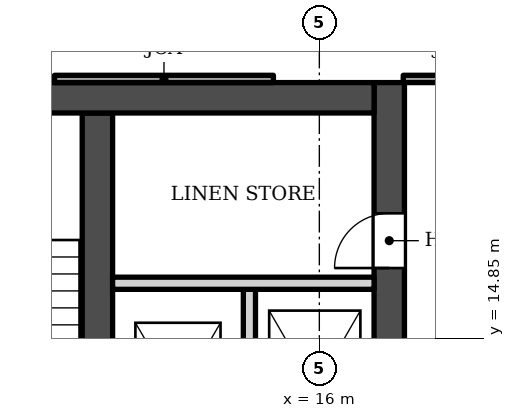
"""IFC4 building model, lengths in metres.
Left out: names, types, materials, properties, quantities, classifications, styles, units other than length and angle.
Written with IfcOpenShell. Run it as: python <this file> out.ifc"""

import sys

from ifc_helpers import new_model, si_unit, direction, frame, frame_2d, origin, place, context, subcontext, project, spatial, polyline, rectangle, outline, extrude, element, fill, save


model = new_model("IFC4")
c1 = context("Model", 3, precision=1e-05, world=origin(), true_north=direction((0.0, 1.0)))
c2 = subcontext(c1, "Body", "Model", "MODEL_VIEW")
j1 = project(units=[si_unit("LENGTHUNIT", "METRE"), si_unit("PLANEANGLEUNIT", "RADIAN")], contexts=[c1])
p1 = place(None, origin())
s1 = spatial("IfcSite", under=j1, at=p1, CompositionType="ELEMENT")
p2 = place(p1, origin())
s2 = spatial("IfcBuilding", under=s1, at=p2, CompositionType="ELEMENT")
p3 = place(p2, frame((0.0, 0.0, 91.8)))
s3 = spatial("IfcBuildingStorey", under=s2, at=p3, CompositionType="ELEMENT", Elevation=91.8)
p4 = place(p3, frame((-16.9, 18.802, 0.0), z_axis=(0.0, 0.0, 1.0), x_axis=(1.0, 0.0, 0.0)))
e1 = element("IfcWall", 1, at=p4, inside=s3, PredefinedType="SHEAR", context=c2, shape_type="SweptSolid", body=[
    extrude(rectangle(XDim=33.8, YDim=0.5, at=frame_2d((16.9, 0.0))), origin(), (0.0, 0.0, 1.0), 3.4),
])
p5 = place(p3, frame((12.35, 5.253, 0.0), z_axis=(0.0, 0.0, 1.0), x_axis=(0.0, 1.0, 0.0)))
e2 = element("IfcWall", 2, at=p5, inside=s3, PredefinedType="SHEAR", context=c2, shape_type="SweptSolid", body=[
    extrude(rectangle(XDim=13.3, YDim=0.5, at=frame_2d((6.65, 0.0))), origin(), (0.0, 0.0, 1.0), 3.4),
])
p6 = place(p3, frame((17.15, 5.853, 0.0), z_axis=(0.0, 0.0, 1.0), x_axis=(0.0, 1.0, 0.0)))
e3 = element("IfcWall", 3, at=p6, inside=s3, PredefinedType="SHEAR", context=c2, shape_type="SweptSolid", body=[
    extrude(rectangle(XDim=13.2, YDim=0.5, at=frame_2d((6.6, 0.0))), origin(), (0.0, 0.0, 1.0), 3.4),
])
p7 = place(p6, frame((4.1, 0.0, 0.0)))
e4 = element("IfcOpeningElement", 4, at=p7, cuts=e3, PredefinedType="OPENING", context=c2, shape_type="SweptSolid", body=[
    extrude(rectangle(XDim=1.6, YDim=2.1, at=frame_2d((0.8, 1.05))), frame((0.0, 0.26, 0.0), z_axis=(0.0, -1.0, 0.0), x_axis=(1.0, 0.0, 0.0)), (0.0, 0.0, 1.0), 0.52),
])
p8 = place(p6, frame((10.15, 0.0, 0.0)))
e5 = element("IfcOpeningElement", 5, at=p8, cuts=e3, PredefinedType="OPENING", context=c2, shape_type="SweptSolid", body=[
    extrude(rectangle(XDim=0.9, YDim=2.1, at=frame_2d((0.45, 1.05))), frame((0.0, 0.26, 0.0), z_axis=(0.0, -1.0, 0.0), x_axis=(1.0, 0.0, 0.0)), (0.0, 0.0, 1.0), 0.52),
])
p9 = place(p3, origin())
e6 = element("IfcWall", 6, at=p9, inside=s3, PredefinedType="SOLIDWALL", context=c2, shape_type="SweptSolid", body=[
    extrude(outline(polyline([(11.645, 19.173), (11.645, 19.052), (15.245, 19.052), (15.245, 19.173), (11.645, 19.173)])), origin(), (0.0, 0.0, 1.0), 2.65),
])
p10 = place(p3, frame((17.38, 19.113, 0.0), z_axis=(0.0, 0.0, 1.0), x_axis=(1.0, 0.0, 0.0)))
e7 = element("IfcWall", 7, at=p10, inside=s3, PredefinedType="SOLIDWALL", context=c2, shape_type="SweptSolid", body=[
    extrude(rectangle(XDim=1.59, YDim=0.12, at=frame_2d((0.795, 0.0))), origin(), (0.0, 0.0, 1.0), 2.65),
])
p11 = place(p3, frame((14.85, 12.653, 0.0), z_axis=(0.0, 0.0, 1.0), x_axis=(0.0, 1.0, 0.0)))
e8 = element("IfcWall", 8, at=p11, inside=s3, PredefinedType="SOLIDWALL", context=c2, shape_type="SweptSolid", body=[
    extrude(rectangle(XDim=3.0, YDim=0.2, at=frame_2d((1.5, 0.0))), origin(), (0.0, 0.0, 1.0), 3.23),
])
p12 = place(p3, frame((12.6, 15.753, 0.0), z_axis=(0.0, 0.0, 1.0), x_axis=(1.0, 0.0, 0.0)))
e9 = element("IfcWall", 9, at=p12, inside=s3, PredefinedType="SOLIDWALL", context=c2, shape_type="SweptSolid", body=[
    extrude(rectangle(XDim=4.3, YDim=0.2, at=frame_2d((2.15, 0.0))), origin(), (0.0, 0.0, 1.0), 3.23),
])
p13 = place(p8, origin())
e10 = element("IfcDoor", 10, at=p13, inside=s3, OperationType="SINGLE_SWING_LEFT", PredefinedType="DOOR", context=c2, shape_type="SweptSolid", body=[
    extrude(rectangle(XDim=0.9, YDim=2.1, at=frame_2d((0.45, 1.05))), frame((0.0, 0.025, 0.0), z_axis=(0.0, -1.0, 0.0), x_axis=(1.0, 0.0, 0.0)), (0.0, 0.0, 1.0), 0.05),
])
fill(e5, e10)
save(model, sys.argv[1])
